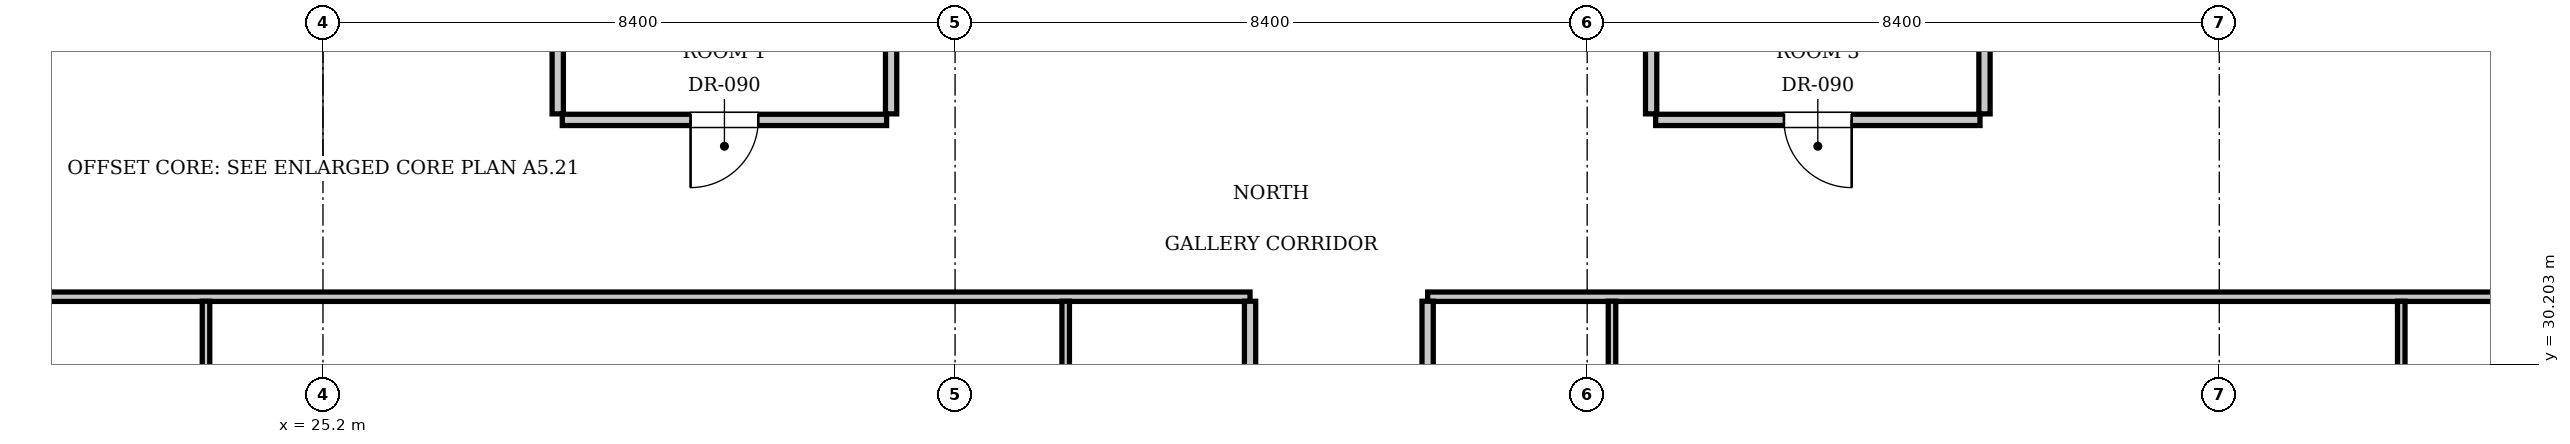
"""IFC4 building model, lengths in metres.
Left out: names, types, materials, properties, quantities, classifications, styles, units other than length and angle.
Written with IfcOpenShell. Run it as: python <this file> out.ifc"""

import sys

from ifc_helpers import new_model, si_unit, direction, frame, frame_2d, origin, place, context, subcontext, project, spatial, rectangle, extrude, element, fill, save


model = new_model("IFC4")
c1 = context("Model", 3, precision=1e-05, world=origin(), true_north=direction((0.0, 1.0)))
c2 = subcontext(c1, "Body", "Model", "MODEL_VIEW")
j1 = project(units=[si_unit("LENGTHUNIT", "METRE"), si_unit("PLANEANGLEUNIT", "RADIAN")], contexts=[c1])
p1 = place(None, origin())
s1 = spatial("IfcSite", under=j1, at=p1, CompositionType="ELEMENT")
p2 = place(p1, origin())
s2 = spatial("IfcBuilding", under=s1, at=p2, CompositionType="ELEMENT")
p3 = place(p2, frame((0.0, 0.0, 177.45)))
s3 = spatial("IfcBuildingStorey", under=s2, at=p3, CompositionType="ELEMENT", Elevation=177.45)
for number, where, z_axis, x_axis in (
    (1, (28.32, 33.53, 0.0), (0.0, 0.0, 1.0), (0.0, 1.0, 0.0)),
    (2, (32.75, 33.53, 0.0), (0.0, 0.0, 1.0), (0.0, 1.0, 0.0)),
):
    element("IfcWall", number, at=place(p3, frame(where, z_axis=z_axis, x_axis=x_axis)), inside=s3, PredefinedType="PARTITIONING", context=c2, shape_type="SweptSolid", body=[
        extrude(rectangle(XDim=2.59, YDim=0.15, at=frame_2d((1.295, 0.0))), origin(), (0.0, 0.0, 1.0), 3.61),
    ])
p4 = place(p3, frame((28.38, 33.45, 0.0), z_axis=(0.0, 0.0, 1.0), x_axis=(1.0, 0.0, 0.0)))
e3 = element("IfcWall", 3, at=p4, inside=s3, PredefinedType="PARTITIONING", context=c2, shape_type="SweptSolid", body=[
    extrude(rectangle(XDim=4.31, YDim=0.15, at=frame_2d((2.155, 0.0))), origin(), (0.0, 0.0, 1.0), 3.61),
])
p5 = place(p4, frame((1.705, 0.0, 0.0)))
e4 = element("IfcOpeningElement", 4, at=p5, cuts=e3, PredefinedType="OPENING", context=c2, shape_type="SweptSolid", body=[
    extrude(rectangle(XDim=0.9, YDim=2.1, at=frame_2d((0.45, 1.05))), frame((0.0, 0.085, 0.0), z_axis=(0.0, -1.0, 0.0), x_axis=(1.0, 0.0, 0.0)), (0.0, 0.0, 1.0), 0.17),
])
for number, where, z_axis, x_axis in (
    (5, (42.85, 33.53, 0.0), (0.0, 0.0, 1.0), (0.0, 1.0, 0.0)),
    (6, (47.28, 33.53, 0.0), (0.0, 0.0, 1.0), (0.0, 1.0, 0.0)),
):
    element("IfcWall", number, at=place(p3, frame(where, z_axis=z_axis, x_axis=x_axis)), inside=s3, PredefinedType="PARTITIONING", context=c2, shape_type="SweptSolid", body=[
        extrude(rectangle(XDim=2.59, YDim=0.15, at=frame_2d((1.295, 0.0))), origin(), (0.0, 0.0, 1.0), 3.61),
    ])
p6 = place(p3, frame((42.91, 33.45, 0.0), z_axis=(0.0, 0.0, 1.0), x_axis=(1.0, 0.0, 0.0)))
e7 = element("IfcWall", 7, at=p6, inside=s3, PredefinedType="PARTITIONING", context=c2, shape_type="SweptSolid", body=[
    extrude(rectangle(XDim=4.31, YDim=0.15, at=frame_2d((2.155, 0.0))), origin(), (0.0, 0.0, 1.0), 3.61),
])
p7 = place(p6, frame((1.705, 0.0, 0.0)))
e8 = element("IfcOpeningElement", 8, at=p7, cuts=e7, PredefinedType="OPENING", context=c2, shape_type="SweptSolid", body=[
    extrude(rectangle(XDim=0.9, YDim=2.1, at=frame_2d((0.45, 1.05))), frame((0.0, 0.085, 0.0), z_axis=(0.0, -1.0, 0.0), x_axis=(1.0, 0.0, 0.0)), (0.0, 0.0, 1.0), 0.17),
])
p8 = place(p3, frame((13.2, 31.1, 0.0), z_axis=(0.0, 0.0, 1.0), x_axis=(1.0, 0.0, 0.0)))
e9 = element("IfcWall", 9, at=p8, inside=s3, PredefinedType="PARTITIONING", context=c2, shape_type="SweptSolid", body=[
    extrude(rectangle(XDim=24.32, YDim=0.125, at=frame_2d((12.16, 0.0))), origin(), (0.0, 0.0, 1.0), 3.61),
])
p9 = place(p3, frame((39.88, 31.1, 0.0), z_axis=(0.0, 0.0, 1.0), x_axis=(1.0, 0.0, 0.0)))
e10 = element("IfcWall", 10, at=p9, inside=s3, PredefinedType="PARTITIONING", context=c2, shape_type="SweptSolid", body=[
    extrude(rectangle(XDim=22.52, YDim=0.125, at=frame_2d((11.26, 0.0))), origin(), (0.0, 0.0, 1.0), 3.61),
])
p10 = place(p3, frame((37.52, 29.15, 0.0), z_axis=(0.0, 0.0, 1.0), x_axis=(0.0, 1.0, 0.0)))
e11 = element("IfcWall", 11, at=p10, inside=s3, PredefinedType="PARTITIONING", context=c2, shape_type="SweptSolid", body=[
    extrude(rectangle(XDim=1.89, YDim=0.15, at=frame_2d((0.945, 0.0))), origin(), (0.0, 0.0, 1.0), 3.61),
])
p11 = place(p3, frame((35.07, 29.15, 0.0), z_axis=(0.0, 0.0, 1.0), x_axis=(0.0, 1.0, 0.0)))
e12 = element("IfcWall", 12, at=p11, inside=s3, PredefinedType="PARTITIONING", context=c2, shape_type="SweptSolid", body=[
    extrude(rectangle(XDim=1.89, YDim=0.1, at=frame_2d((0.945, 0.0))), origin(), (0.0, 0.0, 1.0), 3.61),
])
p12 = place(p3, frame((23.646, 27.06, 0.0), z_axis=(0.0, 0.0, 1.0), x_axis=(0.0, 1.0, 0.0)))
e13 = element("IfcWall", 13, at=p12, inside=s3, PredefinedType="PARTITIONING", context=c2, shape_type="SweptSolid", body=[
    extrude(rectangle(XDim=3.98, YDim=0.1, at=frame_2d((1.99, 0.0))), origin(), (0.0, 0.0, 1.0), 3.61),
])
p13 = place(p12, frame((1.54, 0.0, 0.0)))
e14 = element("IfcOpeningElement", 14, at=p13, cuts=e13, PredefinedType="OPENING", context=c2, shape_type="SweptSolid", body=[
    extrude(rectangle(XDim=0.9, YDim=2.1, at=frame_2d((0.45, 1.05))), frame((0.0, 0.06, 0.0), z_axis=(0.0, -1.0, 0.0), x_axis=(1.0, 0.0, 0.0)), (0.0, 0.0, 1.0), 0.12),
])
p14 = place(p3, frame((39.88, 29.15, 0.0), z_axis=(0.0, 0.0, 1.0), x_axis=(0.0, 1.0, 0.0)))
e15 = element("IfcWall", 15, at=p14, inside=s3, PredefinedType="PARTITIONING", context=c2, shape_type="SweptSolid", body=[
    extrude(rectangle(XDim=1.89, YDim=0.15, at=frame_2d((0.945, 0.0))), origin(), (0.0, 0.0, 1.0), 3.61),
])
p15 = place(p3, frame((42.33, 29.15, 0.0), z_axis=(0.0, 0.0, 1.0), x_axis=(0.0, 1.0, 0.0)))
e16 = element("IfcWall", 16, at=p15, inside=s3, PredefinedType="PARTITIONING", context=c2, shape_type="SweptSolid", body=[
    extrude(rectangle(XDim=1.89, YDim=0.1, at=frame_2d((0.945, 0.0))), origin(), (0.0, 0.0, 1.0), 3.61),
])
p16 = place(p3, frame((52.818, 27.06, 0.0), z_axis=(0.0, 0.0, 1.0), x_axis=(0.0, 1.0, 0.0)))
e17 = element("IfcWall", 17, at=p16, inside=s3, PredefinedType="PARTITIONING", context=c2, shape_type="SweptSolid", body=[
    extrude(rectangle(XDim=3.98, YDim=0.1, at=frame_2d((1.99, 0.0))), origin(), (0.0, 0.0, 1.0), 3.61),
])
p17 = place(p16, frame((1.54, 0.0, 0.0)))
e18 = element("IfcOpeningElement", 18, at=p17, cuts=e17, PredefinedType="OPENING", context=c2, shape_type="SweptSolid", body=[
    extrude(rectangle(XDim=0.9, YDim=2.1, at=frame_2d((0.45, 1.05))), frame((0.0, 0.06, 0.0), z_axis=(0.0, -1.0, 0.0), x_axis=(1.0, 0.0, 0.0)), (0.0, 0.0, 1.0), 0.12),
])
p18 = place(p5, frame((0.9, 0.0, 0.0), z_axis=(0.0, 0.0, 1.0), x_axis=(-1.0, 0.0, 0.0)))
e19 = element("IfcDoor", 19, at=p18, inside=s3, OperationType="SINGLE_SWING_RIGHT", PredefinedType="DOOR", context=c2, shape_type="SweptSolid", body=[
    extrude(rectangle(XDim=0.9, YDim=2.1, at=frame_2d((0.45, 1.05))), frame((0.0, 0.025, 0.0), z_axis=(0.0, -1.0, 0.0), x_axis=(1.0, 0.0, 0.0)), (0.0, 0.0, 1.0), 0.05),
])
fill(e4, e19)
p19 = place(p7, frame((0.9, 0.0, 0.0), z_axis=(0.0, 0.0, 1.0), x_axis=(-1.0, 0.0, 0.0)))
e20 = element("IfcDoor", 20, at=p19, inside=s3, OperationType="SINGLE_SWING_LEFT", PredefinedType="DOOR", context=c2, shape_type="SweptSolid", body=[
    extrude(rectangle(XDim=0.9, YDim=2.1, at=frame_2d((0.45, 1.05))), frame((0.0, 0.025, 0.0), z_axis=(0.0, -1.0, 0.0), x_axis=(1.0, 0.0, 0.0)), (0.0, 0.0, 1.0), 0.05),
])
fill(e8, e20)
save(model, sys.argv[1])
